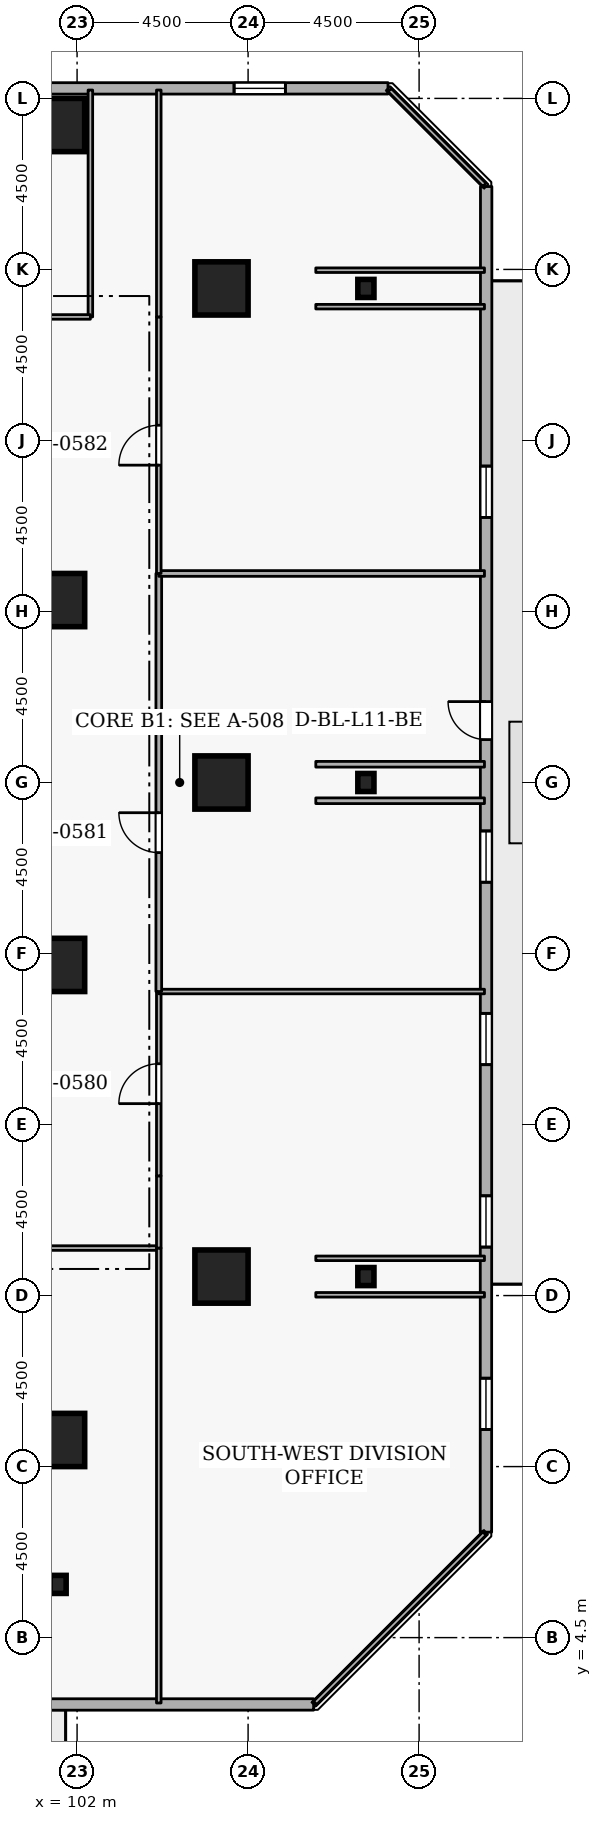
"""IFC4 building model, lengths in metres.
Left out: names, types, materials, properties, quantities, classifications, styles, units other than length and angle.
Written with IfcOpenShell. Run it as: python <this file> out.ifc"""

import sys

from ifc_helpers import new_model, si_unit, direction, frame, frame_2d, origin, origin_2d, place, context, subcontext, project, spatial, rectangle, i_section, extrude, element, fill, save


model = new_model("IFC4")
c1 = context("Model", 3, precision=1e-05, world=origin(), true_north=direction((0.0, 1.0)))
c2 = subcontext(c1, "Body", "Model", "MODEL_VIEW")
j1 = project(units=[si_unit("LENGTHUNIT", "METRE"), si_unit("PLANEANGLEUNIT", "RADIAN")], contexts=[c1])
p1 = place(None, origin())
s1 = spatial("IfcSite", under=j1, at=p1, CompositionType="ELEMENT")
p2 = place(p1, origin())
s2 = spatial("IfcBuilding", under=s1, at=p2, CompositionType="ELEMENT")
p3 = place(p2, frame((0.0, 0.0, 45.9)))
s3 = spatial("IfcBuildingStorey", under=s2, at=p3, CompositionType="ELEMENT", Elevation=45.9)
for number, where, z_axis, x_axis in (
    (1, (105.8, 14.0, 0.0), (0.0, 0.0, 1.0), (1.0, 0.0, 0.0)),
    (2, (105.8, 27.0, 0.0), (0.0, 0.0, 1.0), (1.0, 0.0, 0.0)),
    (3, (105.8, 40.0, 0.0), (0.0, 0.0, 1.0), (1.0, 0.0, 0.0)),
    (4, (101.5, 44.3, 0.0), (0.0, 0.0, 1.0), (1.0, 0.0, 0.0)),
    (5, (101.5, 9.7, 0.0), (0.0, 0.0, 1.0), (1.0, 0.0, 0.0)),
    (6, (101.5, 22.2, 0.0), (0.0, 0.0, 1.0), (1.0, 0.0, 0.0)),
    (7, (101.5, 31.8, 0.0), (0.0, 0.0, 1.0), (1.0, 0.0, 0.0)),
):
    element("IfcColumn", number, at=place(p3, frame(where, z_axis=z_axis, x_axis=x_axis)), inside=s3, PredefinedType="COLUMN", context=c2, shape_type="SweptSolid", body=[
        extrude(rectangle(XDim=1.4, YDim=1.4, at=origin_2d()), origin(), (0.0, 0.0, 1.0), 3.6),
    ])
for number, where, z_axis, x_axis in (
    (8, (109.6, 14.0, 0.0), (0.0, 0.0, 1.0), (1.0, 0.0, 0.0)),
    (9, (109.6, 27.0, 0.0), (0.0, 0.0, 1.0), (1.0, 0.0, 0.0)),
    (10, (109.6, 40.0, 0.0), (0.0, 0.0, 1.0), (1.0, 0.0, 0.0)),
    (11, (101.5, 5.9, 0.0), (0.0, 0.0, 1.0), (1.0, 0.0, 0.0)),
):
    element("IfcColumn", number, at=place(p3, frame(where, z_axis=z_axis, x_axis=x_axis)), inside=s3, PredefinedType="COLUMN", context=c2, shape_type="SweptSolid", body=[
        extrude(i_section(OverallWidth=0.424, OverallDepth=0.475, WebThickness=0.048, FlangeThickness=0.077, FilletRadius=0.015, at=origin_2d()), origin(), (0.0, 0.0, 1.0), 3.6),
    ])
p4 = place(p3, frame((72.819, 2.735, 0.0), z_axis=(0.0, 0.0, 1.0), x_axis=(0.999999983929, 0.00017928314, 0.0)))
e12 = element("IfcWall", 12, at=p4, inside=s3, PredefinedType="STANDARD", context=c2, shape_type="SweptSolid", body=[
    extrude(rectangle(XDim=35.406, YDim=0.3, at=frame_2d((17.703, 0.0))), origin(), (0.0, 0.0, 1.0), 2.22),
])
p5 = place(p4, frame((19.503, 0.0, 0.0)))
e13 = element("IfcOpeningElement", 13, at=p5, cuts=e12, PredefinedType="OPENING", context=c2, shape_type="SweptSolid", body=[
    extrude(rectangle(XDim=1.0, YDim=2.08, at=frame_2d((0.5, 1.04))), frame((0.0, 0.16, 0.0), z_axis=(0.0, -1.0, 0.0), x_axis=(1.0, 0.0, 0.0)), (0.0, 0.0, 1.0), 0.32),
])
p6 = place(p4, frame((2.7, 0.0, 0.72)))
e14 = element("IfcOpeningElement", 14, at=p6, cuts=e12, PredefinedType="OPENING", context=c2, shape_type="SweptSolid", body=[
    extrude(rectangle(XDim=1.35, YDim=1.05, at=frame_2d((0.675, 0.525))), frame((0.0, 0.16, 0.0), z_axis=(0.0, -1.0, 0.0), x_axis=(1.0, 0.0, 0.0)), (0.0, 0.0, 1.0), 0.32),
])
p7 = place(p4, frame((7.5, 0.0, 0.72)))
e15 = element("IfcOpeningElement", 15, at=p7, cuts=e12, PredefinedType="OPENING", context=c2, shape_type="SweptSolid", body=[
    extrude(rectangle(XDim=1.35, YDim=1.05, at=frame_2d((0.675, 0.525))), frame((0.0, 0.16, 0.0), z_axis=(0.0, -1.0, 0.0), x_axis=(1.0, 0.0, 0.0)), (0.0, 0.0, 1.0), 0.32),
])
p8 = place(p4, frame((17.1, 0.0, 0.72)))
e16 = element("IfcOpeningElement", 16, at=p8, cuts=e12, PredefinedType="OPENING", context=c2, shape_type="SweptSolid", body=[
    extrude(rectangle(XDim=1.35, YDim=1.05, at=frame_2d((0.675, 0.525))), frame((0.0, 0.16, 0.0), z_axis=(0.0, -1.0, 0.0), x_axis=(1.0, 0.0, 0.0)), (0.0, 0.0, 1.0), 0.32),
])
p9 = place(p4, frame((21.9, 0.0, 0.72)))
e17 = element("IfcOpeningElement", 17, at=p9, cuts=e12, PredefinedType="OPENING", context=c2, shape_type="SweptSolid", body=[
    extrude(rectangle(XDim=1.35, YDim=1.05, at=frame_2d((0.675, 0.525))), frame((0.0, 0.16, 0.0), z_axis=(0.0, -1.0, 0.0), x_axis=(1.0, 0.0, 0.0)), (0.0, 0.0, 1.0), 0.32),
])
p10 = place(p4, frame((26.7, 0.0, 0.72)))
e18 = element("IfcOpeningElement", 18, at=p10, cuts=e12, PredefinedType="OPENING", context=c2, shape_type="SweptSolid", body=[
    extrude(rectangle(XDim=1.35, YDim=1.05, at=frame_2d((0.675, 0.525))), frame((0.0, 0.16, 0.0), z_axis=(0.0, -1.0, 0.0), x_axis=(1.0, 0.0, 0.0)), (0.0, 0.0, 1.0), 0.32),
])
p11 = place(p3, frame((112.759, 7.275, 0.0), z_axis=(0.0, 0.0, 1.0), x_axis=(0.00017928314, 0.999999983929, 0.0)))
e19 = element("IfcWall", 19, at=p11, inside=s3, PredefinedType="STANDARD", context=c2, shape_type="SweptSolid", body=[
    extrude(rectangle(XDim=35.406, YDim=0.3, at=frame_2d((17.703, 0.0))), origin(), (0.0, 0.0, 1.0), 2.22),
])
p12 = place(p11, frame((20.853, 0.0, 0.0)))
e20 = element("IfcOpeningElement", 20, at=p12, cuts=e19, PredefinedType="OPENING", context=c2, shape_type="SweptSolid", body=[
    extrude(rectangle(XDim=1.0, YDim=2.08, at=frame_2d((0.5, 1.04))), frame((0.0, 0.16, 0.0), z_axis=(0.0, -1.0, 0.0), x_axis=(1.0, 0.0, 0.0)), (0.0, 0.0, 1.0), 0.32),
])
p13 = place(p11, frame((2.7, 0.0, 0.72)))
e21 = element("IfcOpeningElement", 21, at=p13, cuts=e19, PredefinedType="OPENING", context=c2, shape_type="SweptSolid", body=[
    extrude(rectangle(XDim=1.35, YDim=1.05, at=frame_2d((0.675, 0.525))), frame((0.0, 0.16, 0.0), z_axis=(0.0, -1.0, 0.0), x_axis=(1.0, 0.0, 0.0)), (0.0, 0.0, 1.0), 0.32),
])
p14 = place(p11, frame((7.5, 0.0, 0.72)))
e22 = element("IfcOpeningElement", 22, at=p14, cuts=e19, PredefinedType="OPENING", context=c2, shape_type="SweptSolid", body=[
    extrude(rectangle(XDim=1.35, YDim=1.05, at=frame_2d((0.675, 0.525))), frame((0.0, 0.16, 0.0), z_axis=(0.0, -1.0, 0.0), x_axis=(1.0, 0.0, 0.0)), (0.0, 0.0, 1.0), 0.32),
])
p15 = place(p11, frame((12.3, 0.0, 0.72)))
e23 = element("IfcOpeningElement", 23, at=p15, cuts=e19, PredefinedType="OPENING", context=c2, shape_type="SweptSolid", body=[
    extrude(rectangle(XDim=1.35, YDim=1.05, at=frame_2d((0.675, 0.525))), frame((0.0, 0.16, 0.0), z_axis=(0.0, -1.0, 0.0), x_axis=(1.0, 0.0, 0.0)), (0.0, 0.0, 1.0), 0.32),
])
p16 = place(p11, frame((17.1, 0.0, 0.72)))
e24 = element("IfcOpeningElement", 24, at=p16, cuts=e19, PredefinedType="OPENING", context=c2, shape_type="SweptSolid", body=[
    extrude(rectangle(XDim=1.35, YDim=1.05, at=frame_2d((0.675, 0.525))), frame((0.0, 0.16, 0.0), z_axis=(0.0, -1.0, 0.0), x_axis=(1.0, 0.0, 0.0)), (0.0, 0.0, 1.0), 0.32),
])
p17 = place(p11, frame((26.7, 0.0, 0.72)))
e25 = element("IfcOpeningElement", 25, at=p17, cuts=e19, PredefinedType="OPENING", context=c2, shape_type="SweptSolid", body=[
    extrude(rectangle(XDim=1.35, YDim=1.05, at=frame_2d((0.675, 0.525))), frame((0.0, 0.16, 0.0), z_axis=(0.0, -1.0, 0.0), x_axis=(1.0, 0.0, 0.0)), (0.0, 0.0, 1.0), 0.32),
])
p18 = place(p3, frame((110.181, 45.265, 0.0), z_axis=(0.0, 0.0, 1.0), x_axis=(-0.999999983929, -0.00017928314, 0.0)))
e26 = element("IfcWall", 26, at=p18, inside=s3, PredefinedType="STANDARD", context=c2, shape_type="SweptSolid", body=[
    extrude(rectangle(XDim=35.406, YDim=0.3, at=frame_2d((17.703, 0.0))), origin(), (0.0, 0.0, 1.0), 2.22),
])
p19 = place(p18, frame((2.7, 0.0, 0.72)))
e27 = element("IfcOpeningElement", 27, at=p19, cuts=e26, PredefinedType="OPENING", context=c2, shape_type="SweptSolid", body=[
    extrude(rectangle(XDim=1.35, YDim=1.05, at=frame_2d((0.675, 0.525))), frame((0.0, 0.16, 0.0), z_axis=(0.0, -1.0, 0.0), x_axis=(1.0, 0.0, 0.0)), (0.0, 0.0, 1.0), 0.32),
])
p20 = place(p18, frame((12.3, 0.0, 0.72)))
e28 = element("IfcOpeningElement", 28, at=p20, cuts=e26, PredefinedType="OPENING", context=c2, shape_type="SweptSolid", body=[
    extrude(rectangle(XDim=1.35, YDim=1.05, at=frame_2d((0.675, 0.525))), frame((0.0, 0.16, 0.0), z_axis=(0.0, -1.0, 0.0), x_axis=(1.0, 0.0, 0.0)), (0.0, 0.0, 1.0), 0.32),
])
p21 = place(p18, frame((17.1, 0.0, 0.72)))
e29 = element("IfcOpeningElement", 29, at=p21, cuts=e26, PredefinedType="OPENING", context=c2, shape_type="SweptSolid", body=[
    extrude(rectangle(XDim=1.35, YDim=1.05, at=frame_2d((0.675, 0.525))), frame((0.0, 0.16, 0.0), z_axis=(0.0, -1.0, 0.0), x_axis=(1.0, 0.0, 0.0)), (0.0, 0.0, 1.0), 0.32),
])
p22 = place(p18, frame((26.7, 0.0, 0.72)))
e30 = element("IfcOpeningElement", 30, at=p22, cuts=e26, PredefinedType="OPENING", context=c2, shape_type="SweptSolid", body=[
    extrude(rectangle(XDim=1.35, YDim=1.05, at=frame_2d((0.675, 0.525))), frame((0.0, 0.16, 0.0), z_axis=(0.0, -1.0, 0.0), x_axis=(1.0, 0.0, 0.0)), (0.0, 0.0, 1.0), 0.32),
])
p23 = place(p18, frame((31.5, 0.0, 0.72)))
e31 = element("IfcOpeningElement", 31, at=p23, cuts=e26, PredefinedType="OPENING", context=c2, shape_type="SweptSolid", body=[
    extrude(rectangle(XDim=1.35, YDim=1.05, at=frame_2d((0.675, 0.525))), frame((0.0, 0.16, 0.0), z_axis=(0.0, -1.0, 0.0), x_axis=(1.0, 0.0, 0.0)), (0.0, 0.0, 1.0), 0.32),
])
p24 = place(p3, frame((94.8, 14.75, 0.0), z_axis=(0.0, 0.0, 1.0), x_axis=(1.0, 0.0, 0.0)))
e32 = element("IfcWall", 32, at=p24, inside=s3, PredefinedType="PARTITIONING", context=c2, shape_type="SweptSolid", body=[
    extrude(rectangle(XDim=9.35, YDim=0.12, at=frame_2d((4.675, 0.0))), origin(), (0.0, 0.0, 1.0), 3.26),
])
p25 = place(p24, frame((4.15, 0.0, 0.0)))
e33 = element("IfcOpeningElement", 33, at=p25, cuts=e32, PredefinedType="OPENING", context=c2, shape_type="SweptSolid", body=[
    extrude(rectangle(XDim=1.05, YDim=2.1, at=frame_2d((0.525, 1.05))), frame((0.0, 0.07, 0.0), z_axis=(0.0, -1.0, 0.0), x_axis=(1.0, 0.0, 0.0)), (0.0, 0.0, 1.0), 0.14),
])
p26 = place(p3, frame((104.15, 14.75, 0.0), z_axis=(0.0, 0.0, 1.0), x_axis=(0.0, -1.0, 0.0)))
e34 = element("IfcWall", 34, at=p26, inside=s3, PredefinedType="PARTITIONING", context=c2, shape_type="SweptSolid", body=[
    extrude(rectangle(XDim=11.97, YDim=0.12, at=frame_2d((5.985, 0.0))), origin(), (0.0, 0.0, 1.0), 3.26),
])
p27 = place(p3, frame((102.35, 45.22, 0.0), z_axis=(0.0, 0.0, 1.0), x_axis=(0.0, -1.0, 0.0)))
e35 = element("IfcWall", 35, at=p27, inside=s3, PredefinedType="PARTITIONING", context=c2, shape_type="SweptSolid", body=[
    extrude(rectangle(XDim=5.97, YDim=0.12, at=frame_2d((2.985, 0.0))), origin(), (0.0, 0.0, 1.0), 3.26),
])
p28 = place(p3, frame((102.35, 39.25, 0.0), z_axis=(0.0, 0.0, 1.0), x_axis=(-1.0, 0.0, 0.0)))
e36 = element("IfcWall", 36, at=p28, inside=s3, PredefinedType="PARTITIONING", context=c2, shape_type="SweptSolid", body=[
    extrude(rectangle(XDim=1.862, YDim=0.12, at=frame_2d((0.931, 0.0))), origin(), (0.0, 0.0, 1.0), 3.26),
])
p29 = place(p3, frame((104.15, 14.75, 0.0), z_axis=(0.0, 0.0, 1.0), x_axis=(0.0, 1.0, 0.0)))
e37 = element("IfcWall", 37, at=p29, inside=s3, PredefinedType="PARTITIONING", context=c2, shape_type="SweptSolid", body=[
    extrude(rectangle(XDim=1.9, YDim=0.12, at=frame_2d((0.95, 0.0))), origin(), (0.0, 0.0, 1.0), 3.26),
])
p30 = place(p3, frame((104.15, 16.65, 0.0), z_axis=(0.0, 0.0, 1.0), x_axis=(0.0, 1.0, 0.0)))
e38 = element("IfcWall", 38, at=p30, inside=s3, PredefinedType="PARTITIONING", context=c2, shape_type="SweptSolid", body=[
    extrude(rectangle(XDim=4.85, YDim=0.12, at=frame_2d((2.425, 0.0))), origin(), (0.0, 0.0, 1.0), 3.26),
])
p31 = place(p30, frame((1.9, 0.0, 0.0)))
e39 = element("IfcOpeningElement", 39, at=p31, cuts=e38, PredefinedType="OPENING", context=c2, shape_type="SweptSolid", body=[
    extrude(rectangle(XDim=1.05, YDim=2.1, at=frame_2d((0.525, 1.05))), frame((0.0, 0.07, 0.0), z_axis=(0.0, -1.0, 0.0), x_axis=(1.0, 0.0, 0.0)), (0.0, 0.0, 1.0), 0.14),
])
p32 = place(p3, frame((104.15, 21.5, 0.0), z_axis=(0.0, 0.0, 1.0), x_axis=(1.0, 0.0, 0.0)))
e40 = element("IfcWall", 40, at=p32, inside=s3, PredefinedType="PARTITIONING", context=c2, shape_type="SweptSolid", body=[
    extrude(rectangle(XDim=8.57, YDim=0.12, at=frame_2d((4.285, 0.0))), origin(), (0.0, 0.0, 1.0), 3.26),
])
for number, where, z_axis, x_axis in (
    (41, (112.72, 14.48, 0.0), (0.0, 0.0, 1.0), (-1.0, 0.0, 0.0)),
    (42, (108.281, 13.52, 0.0), (0.0, 0.0, 1.0), (1.0, 0.0, 0.0)),
):
    element("IfcWall", number, at=place(p3, frame(where, z_axis=z_axis, x_axis=x_axis)), inside=s3, PredefinedType="PARTITIONING", context=c2, shape_type="SweptSolid", body=[
        extrude(rectangle(XDim=4.438, YDim=0.12, at=frame_2d((2.219, 0.0))), origin(), (0.0, 0.0, 1.0), 1.685),
    ])
p33 = place(p3, frame((112.72, 7.239, 0.0), z_axis=(0.0, 0.0, 1.0), x_axis=(-0.707106781187, -0.707106781187, 0.0)))
e43 = element("IfcWall", 43, at=p33, inside=s3, PredefinedType="PARTITIONING", context=c2, shape_type="SweptSolid", body=[
    extrude(rectangle(XDim=6.305, YDim=0.12, at=frame_2d((3.153, 0.0))), origin(), (0.0, 0.0, 1.0), 3.26),
])
p34 = place(p3, frame((104.15, 21.5, 0.0), z_axis=(0.0, 0.0, 1.0), x_axis=(0.0, 1.0, 0.0)))
e44 = element("IfcWall", 44, at=p34, inside=s3, PredefinedType="PARTITIONING", context=c2, shape_type="SweptSolid", body=[
    extrude(rectangle(XDim=11.0, YDim=0.15, at=frame_2d((5.5, 0.0))), origin(), (0.0, 0.0, 1.0), 3.26),
])
p35 = place(p34, frame((3.655, 0.0, 0.0)))
e45 = element("IfcOpeningElement", 45, at=p35, cuts=e44, PredefinedType="OPENING", context=c2, shape_type="SweptSolid", body=[
    extrude(rectangle(XDim=1.05, YDim=2.1, at=frame_2d((0.525, 1.05))), frame((0.0, 0.085, 0.0), z_axis=(0.0, -1.0, 0.0), x_axis=(1.0, 0.0, 0.0)), (0.0, 0.0, 1.0), 0.17),
])
p36 = place(p3, frame((104.15, 32.5, 0.0), z_axis=(0.0, 0.0, 1.0), x_axis=(1.0, 0.0, 0.0)))
e46 = element("IfcWall", 46, at=p36, inside=s3, PredefinedType="PARTITIONING", context=c2, shape_type="SweptSolid", body=[
    extrude(rectangle(XDim=8.57, YDim=0.15, at=frame_2d((4.285, 0.0))), origin(), (0.0, 0.0, 1.0), 3.26),
])
for number, where, z_axis, x_axis in (
    (47, (112.72, 27.48, 0.0), (0.0, 0.0, 1.0), (-1.0, 0.0, 0.0)),
    (48, (108.281, 26.52, 0.0), (0.0, 0.0, 1.0), (1.0, 0.0, 0.0)),
):
    element("IfcWall", number, at=place(p3, frame(where, z_axis=z_axis, x_axis=x_axis)), inside=s3, PredefinedType="PARTITIONING", context=c2, shape_type="SweptSolid", body=[
        extrude(rectangle(XDim=4.438, YDim=0.15, at=frame_2d((2.219, 0.0))), origin(), (0.0, 0.0, 1.0), 1.685),
    ])
p37 = place(p3, frame((104.15, 32.5, 0.0), z_axis=(0.0, 0.0, 1.0), x_axis=(0.0, 1.0, 0.0)))
e49 = element("IfcWall", 49, at=p37, inside=s3, PredefinedType="PARTITIONING", context=c2, shape_type="SweptSolid", body=[
    extrude(rectangle(XDim=6.75, YDim=0.12, at=frame_2d((3.375, 0.0))), origin(), (0.0, 0.0, 1.0), 3.26),
])
p38 = place(p37, frame((2.85, 0.0, 0.0)))
e50 = element("IfcOpeningElement", 50, at=p38, cuts=e49, PredefinedType="OPENING", context=c2, shape_type="SweptSolid", body=[
    extrude(rectangle(XDim=1.05, YDim=2.1, at=frame_2d((0.525, 1.05))), frame((0.0, 0.07, 0.0), z_axis=(0.0, -1.0, 0.0), x_axis=(1.0, 0.0, 0.0)), (0.0, 0.0, 1.0), 0.14),
])
p39 = place(p3, frame((104.15, 39.25, 0.0), z_axis=(0.0, 0.0, 1.0), x_axis=(0.0, 1.0, 0.0)))
e51 = element("IfcWall", 51, at=p39, inside=s3, PredefinedType="PARTITIONING", context=c2, shape_type="SweptSolid", body=[
    extrude(rectangle(XDim=5.97, YDim=0.12, at=frame_2d((2.985, 0.0))), origin(), (0.0, 0.0, 1.0), 3.26),
])
p40 = place(p3, frame((110.225, 45.22, 0.0), z_axis=(0.0, 0.0, 1.0), x_axis=(0.707106781187, -0.707106781187, 0.0)))
e52 = element("IfcWall", 52, at=p40, inside=s3, PredefinedType="PARTITIONING", context=c2, shape_type="SweptSolid", body=[
    extrude(rectangle(XDim=3.528, YDim=0.12, at=frame_2d((1.764, 0.0))), origin(), (0.0, 0.0, 1.0), 3.26),
])
for number, where, z_axis, x_axis in (
    (53, (112.72, 40.48, 0.0), (0.0, 0.0, 1.0), (-1.0, 0.0, 0.0)),
    (54, (108.281, 39.52, 0.0), (0.0, 0.0, 1.0), (1.0, 0.0, 0.0)),
):
    element("IfcWall", number, at=place(p3, frame(where, z_axis=z_axis, x_axis=x_axis)), inside=s3, PredefinedType="PARTITIONING", context=c2, shape_type="SweptSolid", body=[
        extrude(rectangle(XDim=4.438, YDim=0.12, at=frame_2d((2.219, 0.0))), origin(), (0.0, 0.0, 1.0), 1.685),
    ])
p41 = place(p12, origin())
e55 = element("IfcDoor", 55, at=p41, inside=s3, OperationType="SINGLE_SWING_RIGHT", PredefinedType="DOOR", context=c2, shape_type="SweptSolid", body=[
    extrude(rectangle(XDim=1.0, YDim=2.08, at=frame_2d((0.5, 1.04))), frame((0.0, 0.025, 0.0), z_axis=(0.0, -1.0, 0.0), x_axis=(1.0, 0.0, 0.0)), (0.0, 0.0, 1.0), 0.05),
])
fill(e20, e55)
p42 = place(p13, origin())
e56 = element("IfcWindow", 56, at=p42, inside=s3, PartitioningType="SINGLE_PANEL", PredefinedType="WINDOW", context=c2, shape_type="SweptSolid", body=[
    extrude(rectangle(XDim=1.35, YDim=1.05, at=frame_2d((0.675, 0.525))), frame((0.0, 0.03, 0.0), z_axis=(0.0, -1.0, 0.0), x_axis=(1.0, 0.0, 0.0)), (0.0, 0.0, 1.0), 0.06),
])
fill(e21, e56)
p43 = place(p14, origin())
e57 = element("IfcWindow", 57, at=p43, inside=s3, PartitioningType="SINGLE_PANEL", PredefinedType="WINDOW", context=c2, shape_type="SweptSolid", body=[
    extrude(rectangle(XDim=1.35, YDim=1.05, at=frame_2d((0.675, 0.525))), frame((0.0, 0.03, 0.0), z_axis=(0.0, -1.0, 0.0), x_axis=(1.0, 0.0, 0.0)), (0.0, 0.0, 1.0), 0.06),
])
fill(e22, e57)
p44 = place(p15, origin())
e58 = element("IfcWindow", 58, at=p44, inside=s3, PartitioningType="SINGLE_PANEL", PredefinedType="WINDOW", context=c2, shape_type="SweptSolid", body=[
    extrude(rectangle(XDim=1.35, YDim=1.05, at=frame_2d((0.675, 0.525))), frame((0.0, 0.03, 0.0), z_axis=(0.0, -1.0, 0.0), x_axis=(1.0, 0.0, 0.0)), (0.0, 0.0, 1.0), 0.06),
])
fill(e23, e58)
p45 = place(p16, origin())
e59 = element("IfcWindow", 59, at=p45, inside=s3, PartitioningType="SINGLE_PANEL", PredefinedType="WINDOW", context=c2, shape_type="SweptSolid", body=[
    extrude(rectangle(XDim=1.35, YDim=1.05, at=frame_2d((0.675, 0.525))), frame((0.0, 0.03, 0.0), z_axis=(0.0, -1.0, 0.0), x_axis=(1.0, 0.0, 0.0)), (0.0, 0.0, 1.0), 0.06),
])
fill(e24, e59)
p46 = place(p17, origin())
e60 = element("IfcWindow", 60, at=p46, inside=s3, PartitioningType="SINGLE_PANEL", PredefinedType="WINDOW", context=c2, shape_type="SweptSolid", body=[
    extrude(rectangle(XDim=1.35, YDim=1.05, at=frame_2d((0.675, 0.525))), frame((0.0, 0.03, 0.0), z_axis=(0.0, -1.0, 0.0), x_axis=(1.0, 0.0, 0.0)), (0.0, 0.0, 1.0), 0.06),
])
fill(e25, e60)
p47 = place(p19, origin())
e61 = element("IfcWindow", 61, at=p47, inside=s3, PartitioningType="SINGLE_PANEL", PredefinedType="WINDOW", context=c2, shape_type="SweptSolid", body=[
    extrude(rectangle(XDim=1.35, YDim=1.05, at=frame_2d((0.675, 0.525))), frame((0.0, 0.03, 0.0), z_axis=(0.0, -1.0, 0.0), x_axis=(1.0, 0.0, 0.0)), (0.0, 0.0, 1.0), 0.06),
])
fill(e27, e61)
p48 = place(p31, origin())
e62 = element("IfcDoor", 62, at=p48, inside=s3, OperationType="SINGLE_SWING_LEFT", PredefinedType="DOOR", context=c2, shape_type="SweptSolid", body=[
    extrude(rectangle(XDim=1.05, YDim=2.1, at=frame_2d((0.525, 1.05))), frame((0.0, 0.025, 0.0), z_axis=(0.0, -1.0, 0.0), x_axis=(1.0, 0.0, 0.0)), (0.0, 0.0, 1.0), 0.05),
])
fill(e39, e62)
p49 = place(p35, origin())
e63 = element("IfcDoor", 63, at=p49, inside=s3, OperationType="SINGLE_SWING_RIGHT", PredefinedType="DOOR", context=c2, shape_type="SweptSolid", body=[
    extrude(rectangle(XDim=1.05, YDim=2.1, at=frame_2d((0.525, 1.05))), frame((0.0, 0.025, 0.0), z_axis=(0.0, -1.0, 0.0), x_axis=(1.0, 0.0, 0.0)), (0.0, 0.0, 1.0), 0.05),
])
fill(e45, e63)
p50 = place(p38, origin())
e64 = element("IfcDoor", 64, at=p50, inside=s3, OperationType="SINGLE_SWING_LEFT", PredefinedType="DOOR", context=c2, shape_type="SweptSolid", body=[
    extrude(rectangle(XDim=1.05, YDim=2.1, at=frame_2d((0.525, 1.05))), frame((0.0, 0.025, 0.0), z_axis=(0.0, -1.0, 0.0), x_axis=(1.0, 0.0, 0.0)), (0.0, 0.0, 1.0), 0.05),
])
fill(e50, e64)
save(model, sys.argv[1])
